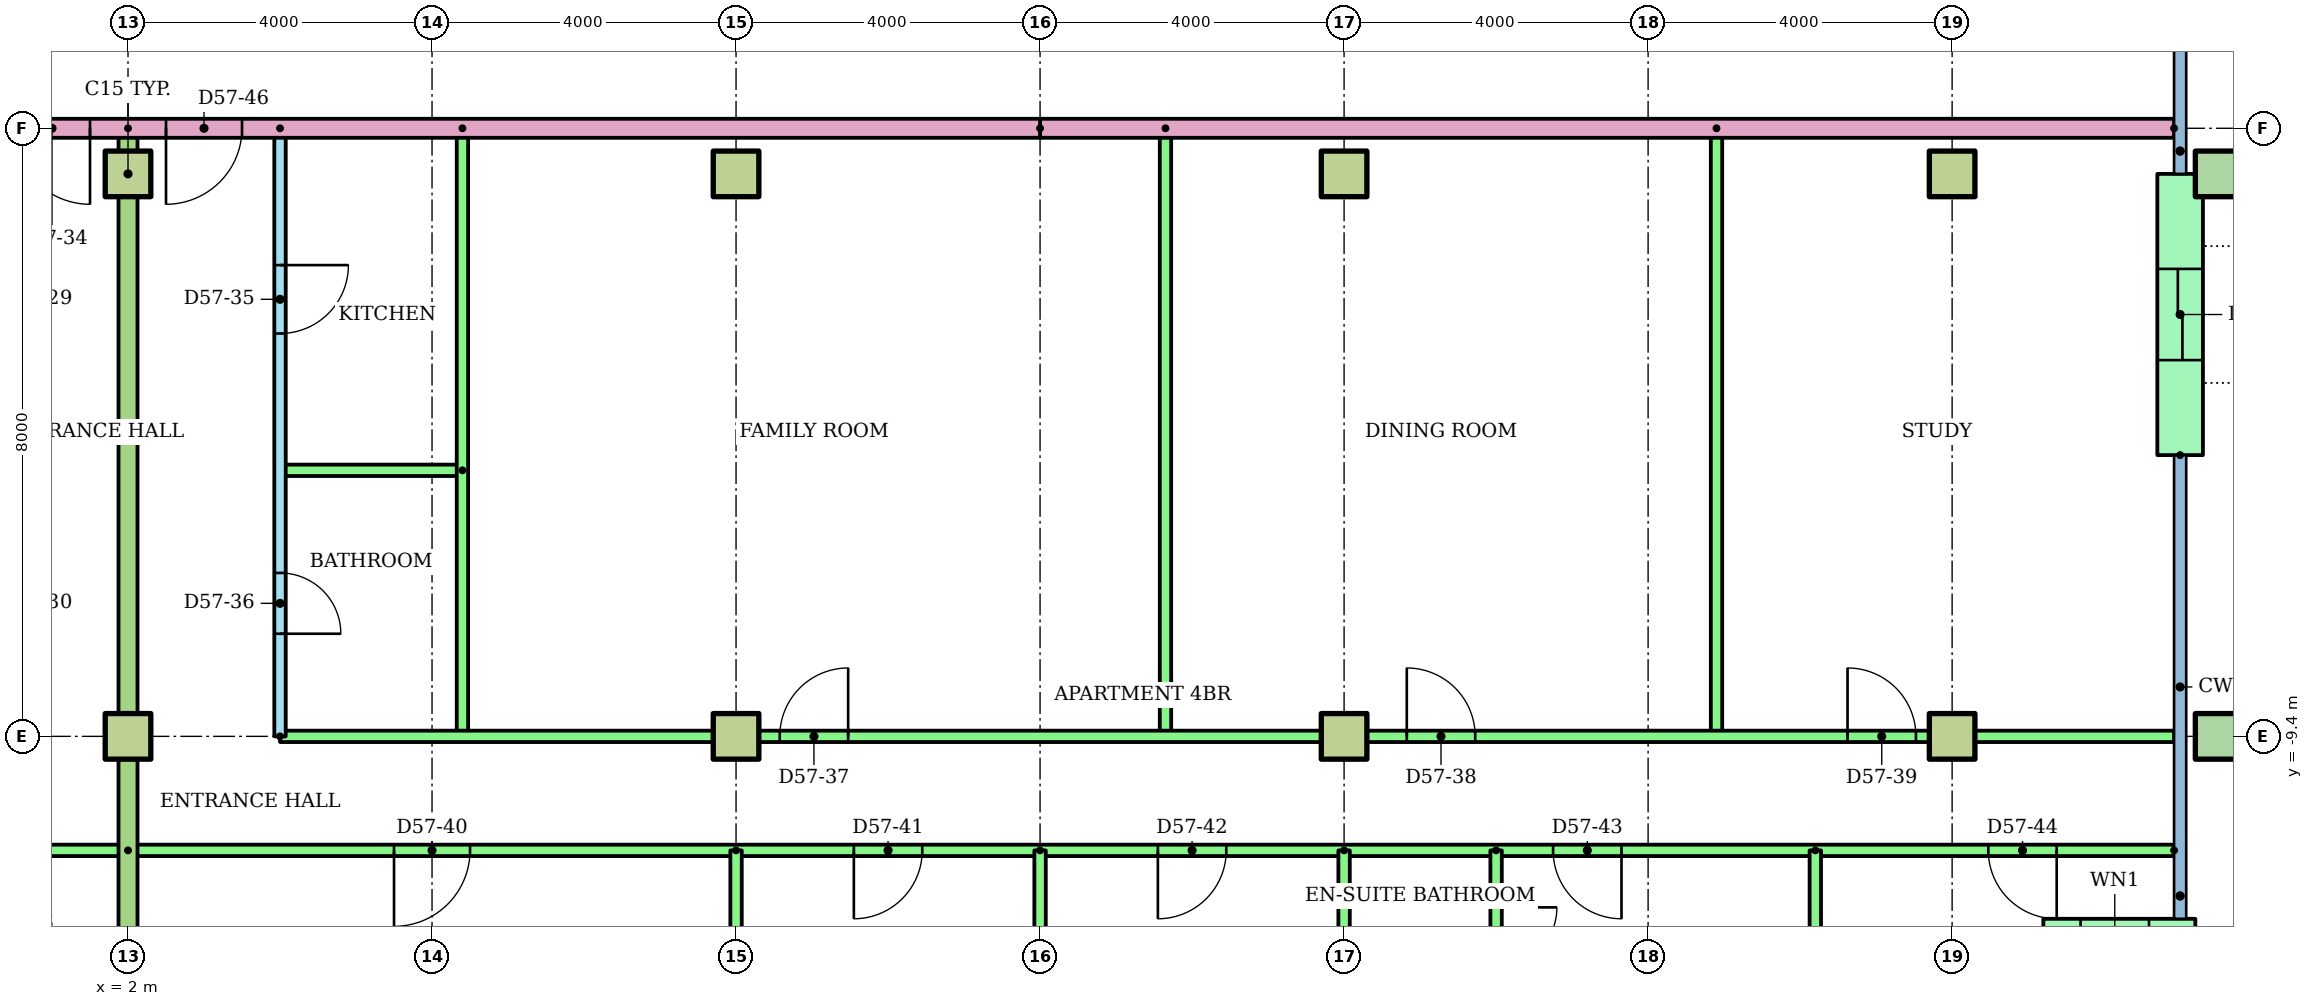
"""IFC4 building model, lengths in metres.
Left out: names, types, materials, properties, quantities, classifications, styles, units other than length and angle.
Written with IfcOpenShell. Run it as: python <this file> out.ifc"""

import sys

from ifc_helpers import new_model, si_unit, direction, frame, frame_2d, origin, origin_2d, place, context, subcontext, project, spatial, rectangle, hollow_rectangle, extrude, element, fill, save


model = new_model("IFC4")
c1 = context("Model", 3, precision=1e-05, world=origin(), true_north=direction((0.0, 1.0)))
c2 = subcontext(c1, "Body", "Model", "MODEL_VIEW")
j1 = project(units=[si_unit("LENGTHUNIT", "METRE"), si_unit("PLANEANGLEUNIT", "RADIAN")], contexts=[c1])
p1 = place(None, origin())
s1 = spatial("IfcSite", under=j1, at=p1, CompositionType="ELEMENT")
p2 = place(p1, origin())
s2 = spatial("IfcBuilding", under=s1, at=p2, CompositionType="ELEMENT")
p3 = place(p2, frame((0.0, 0.0, 220.4)))
s3 = spatial("IfcBuildingStorey", under=s2, at=p3, CompositionType="ELEMENT", Elevation=220.4)
for number, where in (
    (1, (2.0, -9.4, 0.0)),
    (2, (10.0, -9.4, 0.0)),
    (3, (18.0, -9.4, 0.0)),
    (4, (26.0, -9.4, 0.0)),
):
    element("IfcColumn", number, at=place(p3, frame(where)), inside=s3, PredefinedType="COLUMN", context=c2, shape_type="SweptSolid", body=[
        extrude(rectangle(XDim=0.6, YDim=0.6, at=origin_2d()), origin(), (0.0, 0.0, 1.0), 3.2),
    ])
p4 = place(p3, frame((29.5, -9.4, 0.0)))
e5 = element("IfcColumn", 5, at=p4, inside=s3, PredefinedType="COLUMN", context=c2, shape_type="SweptSolid", body=[
    extrude(hollow_rectangle(XDim=0.6, YDim=0.6, WallThickness=0.03, at=origin_2d()), origin(), (0.0, 0.0, 1.0), 3.2),
])
for number, where in (
    (6, (2.0, -2.0, 0.0)),
    (7, (10.0, -2.0, 0.0)),
    (8, (18.0, -2.0, 0.0)),
    (9, (26.0, -2.0, 0.0)),
):
    element("IfcColumn", number, at=place(p3, frame(where)), inside=s3, PredefinedType="COLUMN", context=c2, shape_type="SweptSolid", body=[
        extrude(rectangle(XDim=0.6, YDim=0.6, at=origin_2d()), origin(), (0.0, 0.0, 1.0), 3.2),
    ])
p5 = place(p3, frame((29.5, -2.0, 0.0)))
e10 = element("IfcColumn", 10, at=p5, inside=s3, PredefinedType="COLUMN", context=c2, shape_type="SweptSolid", body=[
    extrude(hollow_rectangle(XDim=0.6, YDim=0.6, WallThickness=0.03, at=origin_2d()), origin(), (0.0, 0.0, 1.0), 3.2),
])
p6 = place(p3, frame((27.2, -12.1, 0.0)))
e11 = element("IfcWall", 11, at=p6, inside=s3, PredefinedType="STANDARD", context=c2, shape_type="SweptSolid", body=[
    extrude(rectangle(XDim=2.0, YDim=0.6, at=frame_2d((1.0, 0.0))), origin(), (0.0, 0.0, 1.0), 2.92),
])
p7 = place(p6, frame((0.49, 0.0, 0.9)))
e12 = element("IfcOpeningElement", 12, at=p7, cuts=e11, PredefinedType="OPENING", context=c2, shape_type="SweptSolid", body=[
    extrude(rectangle(XDim=0.9, YDim=1.5, at=frame_2d((0.45, 0.75))), frame((0.0, 0.31, 0.0), z_axis=(0.0, -1.0, 0.0), x_axis=(1.0, 0.0, 0.0)), (0.0, 0.0, 1.0), 0.62),
])
p8 = place(p3, frame((29.0, -5.7, 0.0), z_axis=(0.0, 0.0, 1.0), x_axis=(0.0, 1.0, 0.0)))
e13 = element("IfcWall", 13, at=p8, inside=s3, PredefinedType="STANDARD", context=c2, shape_type="SweptSolid", body=[
    extrude(rectangle(XDim=3.7, YDim=0.6, at=frame_2d((1.85, 0.0))), origin(), (0.0, 0.0, 1.0), 2.92),
])
p9 = place(p8, frame((1.25, 0.0, 0.0)))
e14 = element("IfcOpeningElement", 14, at=p9, cuts=e13, PredefinedType="OPENING", context=c2, shape_type="SweptSolid", body=[
    extrude(rectangle(XDim=1.2, YDim=2.1, at=frame_2d((0.6, 1.05))), frame((0.0, 0.31, 0.0), z_axis=(0.0, -1.0, 0.0), x_axis=(1.0, 0.0, 0.0)), (0.0, 0.0, 1.0), 0.62),
])
p10 = place(p3, frame((2.0, -10.9, 0.0), z_axis=(0.0, 0.0, 1.0), x_axis=(-1.0, 0.0, 0.0)))
e15 = element("IfcWall", 15, at=p10, inside=s3, PredefinedType="PARTITIONING", context=c2, shape_type="SweptSolid", body=[
    extrude(rectangle(XDim=8.0, YDim=0.15, at=frame_2d((4.0, 0.0))), origin(), (0.0, 0.0, 1.0), 2.4),
])
p11 = place(p10, frame((5.55, 0.0, 0.0)))
e16 = element("IfcOpeningElement", 16, at=p11, cuts=e15, PredefinedType="OPENING", context=c2, shape_type="SweptSolid", body=[
    extrude(rectangle(XDim=0.9, YDim=2.1, at=frame_2d((0.45, 1.05))), frame((0.0, 0.085, 0.0), z_axis=(0.0, -1.0, 0.0), x_axis=(1.0, 0.0, 0.0)), (0.0, 0.0, 1.0), 0.17),
])
p12 = place(p10, frame((1.5, 0.0, 0.0)))
e17 = element("IfcOpeningElement", 17, at=p12, cuts=e15, PredefinedType="OPENING", context=c2, shape_type="SweptSolid", body=[
    extrude(rectangle(XDim=1.0, YDim=2.1, at=frame_2d((0.5, 1.05))), frame((0.0, 0.085, 0.0), z_axis=(0.0, -1.0, 0.0), x_axis=(1.0, 0.0, 0.0)), (0.0, 0.0, 1.0), 0.17),
])
p13 = place(p3, frame((4.0, -1.4, 0.0), z_axis=(0.0, 0.0, 1.0), x_axis=(0.0, -1.0, 0.0)))
e18 = element("IfcWall", 18, at=p13, inside=s3, PredefinedType="PARTITIONING", context=c2, shape_type="SweptSolid", body=[
    extrude(rectangle(XDim=8.0, YDim=0.15, at=frame_2d((4.0, 0.0))), origin(), (0.0, 0.0, 1.0), 2.4),
])
p14 = place(p13, frame((1.8, 0.0, 0.0)))
e19 = element("IfcOpeningElement", 19, at=p14, cuts=e18, PredefinedType="OPENING", context=c2, shape_type="SweptSolid", body=[
    extrude(rectangle(XDim=0.9, YDim=2.1, at=frame_2d((0.45, 1.05))), frame((0.0, 0.085, 0.0), z_axis=(0.0, -1.0, 0.0), x_axis=(1.0, 0.0, 0.0)), (0.0, 0.0, 1.0), 0.17),
])
p15 = place(p13, frame((5.85, 0.0, 0.0)))
e20 = element("IfcOpeningElement", 20, at=p15, cuts=e18, PredefinedType="OPENING", context=c2, shape_type="SweptSolid", body=[
    extrude(rectangle(XDim=0.8, YDim=2.1, at=frame_2d((0.4, 1.05))), frame((0.0, 0.085, 0.0), z_axis=(0.0, -1.0, 0.0), x_axis=(1.0, 0.0, 0.0)), (0.0, 0.0, 1.0), 0.17),
])
p16 = place(p3, frame((6.4, -5.9, 0.0), z_axis=(0.0, 0.0, 1.0), x_axis=(-1.0, 0.0, 0.0)))
e21 = element("IfcWall", 21, at=p16, inside=s3, PredefinedType="PARTITIONING", context=c2, shape_type="SweptSolid", body=[
    extrude(rectangle(XDim=2.4, YDim=0.15, at=frame_2d((1.2, 0.0))), origin(), (0.0, 0.0, 1.0), 2.4),
])
for number, where, z_axis, x_axis in (
    (22, (6.4, -1.4, 0.0), (0.0, 0.0, 1.0), (0.0, -1.0, 0.0)),
    (23, (15.65, -1.4, 0.0), (0.0, 0.0, 1.0), (0.0, -1.0, 0.0)),
    (24, (22.9, -1.4, 0.0), (0.0, 0.0, 1.0), (0.0, -1.0, 0.0)),
):
    element("IfcWall", number, at=place(p3, frame(where, z_axis=z_axis, x_axis=x_axis)), inside=s3, PredefinedType="PARTITIONING", context=c2, shape_type="SweptSolid", body=[
        extrude(rectangle(XDim=8.0, YDim=0.15, at=frame_2d((4.0, 0.0))), origin(), (0.0, 0.0, 1.0), 2.4),
    ])
p17 = place(p3, frame((4.0, -9.4, 0.0)))
e25 = element("IfcWall", 25, at=p17, inside=s3, PredefinedType="PARTITIONING", context=c2, shape_type="SweptSolid", body=[
    extrude(rectangle(XDim=24.92, YDim=0.15, at=frame_2d((12.46, 0.0))), origin(), (0.0, 0.0, 1.0), 2.4),
])
p18 = place(p17, frame((6.575, 0.0, 0.0)))
e26 = element("IfcOpeningElement", 26, at=p18, cuts=e25, PredefinedType="OPENING", context=c2, shape_type="SweptSolid", body=[
    extrude(rectangle(XDim=0.9, YDim=2.1, at=frame_2d((0.45, 1.05))), frame((0.0, 0.085, 0.0), z_axis=(0.0, -1.0, 0.0), x_axis=(1.0, 0.0, 0.0)), (0.0, 0.0, 1.0), 0.17),
])
p19 = place(p17, frame((14.825, 0.0, 0.0)))
e27 = element("IfcOpeningElement", 27, at=p19, cuts=e25, PredefinedType="OPENING", context=c2, shape_type="SweptSolid", body=[
    extrude(rectangle(XDim=0.9, YDim=2.1, at=frame_2d((0.45, 1.05))), frame((0.0, 0.085, 0.0), z_axis=(0.0, -1.0, 0.0), x_axis=(1.0, 0.0, 0.0)), (0.0, 0.0, 1.0), 0.17),
])
p20 = place(p17, frame((20.624, 0.0, 0.0)))
e28 = element("IfcOpeningElement", 28, at=p20, cuts=e25, PredefinedType="OPENING", context=c2, shape_type="SweptSolid", body=[
    extrude(rectangle(XDim=0.9, YDim=2.1, at=frame_2d((0.45, 1.05))), frame((0.0, 0.085, 0.0), z_axis=(0.0, -1.0, 0.0), x_axis=(1.0, 0.0, 0.0)), (0.0, 0.0, 1.0), 0.17),
])
p21 = place(p3, frame((28.92, -10.9, 0.0), z_axis=(0.0, 0.0, 1.0), x_axis=(-1.0, 0.0, 0.0)))
e29 = element("IfcWall", 29, at=p21, inside=s3, PredefinedType="PARTITIONING", context=c2, shape_type="SweptSolid", body=[
    extrude(rectangle(XDim=26.92, YDim=0.15, at=frame_2d((13.46, 0.0))), origin(), (0.0, 0.0, 1.0), 2.4),
])
p22 = place(p21, frame((22.42, 0.0, 0.0)))
e30 = element("IfcOpeningElement", 30, at=p22, cuts=e29, PredefinedType="OPENING", context=c2, shape_type="SweptSolid", body=[
    extrude(rectangle(XDim=1.0, YDim=2.1, at=frame_2d((0.5, 1.05))), frame((0.0, 0.085, 0.0), z_axis=(0.0, -1.0, 0.0), x_axis=(1.0, 0.0, 0.0)), (0.0, 0.0, 1.0), 0.17),
])
p23 = place(p21, frame((16.47, 0.0, 0.0)))
e31 = element("IfcOpeningElement", 31, at=p23, cuts=e29, PredefinedType="OPENING", context=c2, shape_type="SweptSolid", body=[
    extrude(rectangle(XDim=0.9, YDim=2.1, at=frame_2d((0.45, 1.05))), frame((0.0, 0.085, 0.0), z_axis=(0.0, -1.0, 0.0), x_axis=(1.0, 0.0, 0.0)), (0.0, 0.0, 1.0), 0.17),
])
p24 = place(p21, frame((12.47, 0.0, 0.0)))
e32 = element("IfcOpeningElement", 32, at=p24, cuts=e29, PredefinedType="OPENING", context=c2, shape_type="SweptSolid", body=[
    extrude(rectangle(XDim=0.9, YDim=2.1, at=frame_2d((0.45, 1.05))), frame((0.0, 0.085, 0.0), z_axis=(0.0, -1.0, 0.0), x_axis=(1.0, 0.0, 0.0)), (0.0, 0.0, 1.0), 0.17),
])
p25 = place(p21, frame((7.27, 0.0, 0.0)))
e33 = element("IfcOpeningElement", 33, at=p25, cuts=e29, PredefinedType="OPENING", context=c2, shape_type="SweptSolid", body=[
    extrude(rectangle(XDim=0.9, YDim=2.1, at=frame_2d((0.45, 1.05))), frame((0.0, 0.085, 0.0), z_axis=(0.0, -1.0, 0.0), x_axis=(1.0, 0.0, 0.0)), (0.0, 0.0, 1.0), 0.17),
])
p26 = place(p21, frame((1.544, 0.0, 0.0)))
e34 = element("IfcOpeningElement", 34, at=p26, cuts=e29, PredefinedType="OPENING", context=c2, shape_type="SweptSolid", body=[
    extrude(rectangle(XDim=0.9, YDim=2.1, at=frame_2d((0.45, 1.05))), frame((0.0, 0.085, 0.0), z_axis=(0.0, -1.0, 0.0), x_axis=(1.0, 0.0, 0.0)), (0.0, 0.0, 1.0), 0.17),
])
p27 = place(p3, frame((10.0, -10.9, 0.0), z_axis=(0.0, 0.0, 1.0), x_axis=(0.0, -1.0, 0.0)))
e35 = element("IfcWall", 35, at=p27, inside=s3, PredefinedType="PARTITIONING", context=c2, shape_type="SweptSolid", body=[
    extrude(rectangle(XDim=5.61, YDim=0.15, at=frame_2d((2.805, 0.0))), origin(), (0.0, 0.0, 1.0), 2.4),
])
p28 = place(p3, frame((14.0, -10.9, 0.0), z_axis=(0.0, 0.0, 1.0), x_axis=(0.0, -1.0, 0.0)))
e36 = element("IfcWall", 36, at=p28, inside=s3, PredefinedType="PARTITIONING", context=c2, shape_type="SweptSolid", body=[
    extrude(rectangle(XDim=5.621, YDim=0.15, at=frame_2d((2.811, 0.0))), origin(), (0.0, 0.0, 1.0), 2.4),
])
p29 = place(p3, frame((18.0, -10.9, 0.0), z_axis=(0.0, 0.0, 1.0), x_axis=(0.0, -1.0, 0.0)))
e37 = element("IfcWall", 37, at=p29, inside=s3, PredefinedType="PARTITIONING", context=c2, shape_type="SweptSolid", body=[
    extrude(rectangle(XDim=5.61, YDim=0.15, at=frame_2d((2.805, 0.0))), origin(), (0.0, 0.0, 1.0), 2.4),
])
p30 = place(p3, frame((24.2, -10.9, 0.0), z_axis=(0.0, 0.0, 1.0), x_axis=(0.0, -1.0, 0.0)))
e38 = element("IfcWall", 38, at=p30, inside=s3, PredefinedType="PARTITIONING", context=c2, shape_type="SweptSolid", body=[
    extrude(rectangle(XDim=3.82, YDim=0.15, at=frame_2d((1.91, 0.0))), origin(), (0.0, 0.0, 1.0), 2.4),
])
p31 = place(p3, frame((20.0, -10.9, 0.0), z_axis=(0.0, 0.0, 1.0), x_axis=(0.0, -1.0, 0.0)))
e39 = element("IfcWall", 39, at=p31, inside=s3, PredefinedType="PARTITIONING", context=c2, shape_type="SweptSolid", body=[
    extrude(rectangle(XDim=2.3, YDim=0.15, at=frame_2d((1.15, 0.0))), origin(), (0.0, 0.0, 1.0), 2.4),
])
p32 = place(p31, frame((0.75, 0.0, 0.0)))
e40 = element("IfcOpeningElement", 40, at=p32, cuts=e39, PredefinedType="OPENING", context=c2, shape_type="SweptSolid", body=[
    extrude(rectangle(XDim=0.8, YDim=2.1, at=frame_2d((0.4, 1.05))), frame((0.0, 0.085, 0.0), z_axis=(0.0, -1.0, 0.0), x_axis=(1.0, 0.0, 0.0)), (0.0, 0.0, 1.0), 0.17),
])
p33 = place(p3, frame((2.0, -1.4, 0.0), z_axis=(0.0, 0.0, 1.0), x_axis=(0.0, -1.0, 0.0)))
e41 = element("IfcWall", 41, at=p33, inside=s3, PredefinedType="PARTITIONING", context=c2, shape_type="SweptSolid", body=[
    extrude(rectangle(XDim=15.11, YDim=0.25, at=frame_2d((7.555, 0.0))), origin(), (0.0, 0.0, 1.0), 2.4),
])
p34 = place(p3, frame((28.92, -1.4, 0.0), z_axis=(0.0, 0.0, 1.0), x_axis=(-1.0, 0.0, 0.0)))
e42 = element("IfcWall", 42, at=p34, inside=s3, PredefinedType="PARTITIONING", context=c2, shape_type="SweptSolid", body=[
    extrude(rectangle(XDim=14.92, YDim=0.25, at=frame_2d((7.46, 0.0))), origin(), (0.0, 0.0, 1.0), 2.4),
])
p35 = place(p3, frame((14.0, -1.4, 0.0), z_axis=(0.0, 0.0, 1.0), x_axis=(-1.0, 0.0, 0.0)))
e43 = element("IfcWall", 43, at=p35, inside=s3, PredefinedType="PARTITIONING", context=c2, shape_type="SweptSolid", body=[
    extrude(rectangle(XDim=28.0, YDim=0.25, at=frame_2d((14.0, 0.0))), origin(), (0.0, 0.0, 1.0), 2.4),
])
p36 = place(p35, frame((20.5, 0.0, 0.0)))
e44 = element("IfcOpeningElement", 44, at=p36, cuts=e43, PredefinedType="OPENING", context=c2, shape_type="SweptSolid", body=[
    extrude(rectangle(XDim=1.0, YDim=2.1, at=frame_2d((0.5, 1.05))), frame((0.0, 0.135, 0.0), z_axis=(0.0, -1.0, 0.0), x_axis=(1.0, 0.0, 0.0)), (0.0, 0.0, 1.0), 0.27),
])
p37 = place(p35, frame((12.5, 0.0, 0.0)))
e45 = element("IfcOpeningElement", 45, at=p37, cuts=e43, PredefinedType="OPENING", context=c2, shape_type="SweptSolid", body=[
    extrude(rectangle(XDim=1.0, YDim=2.1, at=frame_2d((0.5, 1.05))), frame((0.0, 0.135, 0.0), z_axis=(0.0, -1.0, 0.0), x_axis=(1.0, 0.0, 0.0)), (0.0, 0.0, 1.0), 0.27),
])
p38 = place(p35, frame((10.5, 0.0, 0.0)))
e46 = element("IfcOpeningElement", 46, at=p38, cuts=e43, PredefinedType="OPENING", context=c2, shape_type="SweptSolid", body=[
    extrude(rectangle(XDim=1.0, YDim=2.1, at=frame_2d((0.5, 1.05))), frame((0.0, 0.135, 0.0), z_axis=(0.0, -1.0, 0.0), x_axis=(1.0, 0.0, 0.0)), (0.0, 0.0, 1.0), 0.27),
])
p39 = place(p37, origin())
e47 = element("IfcDoor", 47, at=p39, inside=s3, OperationType="SINGLE_SWING_LEFT", PredefinedType="DOOR", context=c2, shape_type="SweptSolid", body=[
    extrude(rectangle(XDim=1.0, YDim=2.1, at=frame_2d((0.5, 1.05))), frame((0.0, 0.025, 0.0), z_axis=(0.0, -1.0, 0.0), x_axis=(1.0, 0.0, 0.0)), (0.0, 0.0, 1.0), 0.05),
])
fill(e45, e47)
p40 = place(p14, origin())
e48 = element("IfcDoor", 48, at=p40, inside=s3, OperationType="SINGLE_SWING_LEFT", PredefinedType="DOOR", context=c2, shape_type="SweptSolid", body=[
    extrude(rectangle(XDim=0.9, YDim=2.1, at=frame_2d((0.45, 1.05))), frame((0.0, 0.025, 0.0), z_axis=(0.0, -1.0, 0.0), x_axis=(1.0, 0.0, 0.0)), (0.0, 0.0, 1.0), 0.05),
])
fill(e19, e48)
p41 = place(p15, origin())
e49 = element("IfcDoor", 49, at=p41, inside=s3, OperationType="SINGLE_SWING_RIGHT", PredefinedType="DOOR", context=c2, shape_type="SweptSolid", body=[
    extrude(rectangle(XDim=0.8, YDim=2.1, at=frame_2d((0.4, 1.05))), frame((0.0, 0.025, 0.0), z_axis=(0.0, -1.0, 0.0), x_axis=(1.0, 0.0, 0.0)), (0.0, 0.0, 1.0), 0.05),
])
fill(e20, e49)
p42 = place(p18, origin())
e50 = element("IfcDoor", 50, at=p42, inside=s3, OperationType="SINGLE_SWING_RIGHT", PredefinedType="DOOR", context=c2, shape_type="SweptSolid", body=[
    extrude(rectangle(XDim=0.9, YDim=2.1, at=frame_2d((0.45, 1.05))), frame((0.0, 0.025, 0.0), z_axis=(0.0, -1.0, 0.0), x_axis=(1.0, 0.0, 0.0)), (0.0, 0.0, 1.0), 0.05),
])
fill(e26, e50)
p43 = place(p19, origin())
e51 = element("IfcDoor", 51, at=p43, inside=s3, OperationType="SINGLE_SWING_LEFT", PredefinedType="DOOR", context=c2, shape_type="SweptSolid", body=[
    extrude(rectangle(XDim=0.9, YDim=2.1, at=frame_2d((0.45, 1.05))), frame((0.0, 0.025, 0.0), z_axis=(0.0, -1.0, 0.0), x_axis=(1.0, 0.0, 0.0)), (0.0, 0.0, 1.0), 0.05),
])
fill(e27, e51)
p44 = place(p20, origin())
e52 = element("IfcDoor", 52, at=p44, inside=s3, OperationType="SINGLE_SWING_LEFT", PredefinedType="DOOR", context=c2, shape_type="SweptSolid", body=[
    extrude(rectangle(XDim=0.9, YDim=2.1, at=frame_2d((0.45, 1.05))), frame((0.0, 0.025, 0.0), z_axis=(0.0, -1.0, 0.0), x_axis=(1.0, 0.0, 0.0)), (0.0, 0.0, 1.0), 0.05),
])
fill(e28, e52)
p45 = place(p22, origin())
e53 = element("IfcDoor", 53, at=p45, inside=s3, OperationType="SINGLE_SWING_RIGHT", PredefinedType="DOOR", context=c2, shape_type="SweptSolid", body=[
    extrude(rectangle(XDim=1.0, YDim=2.1, at=frame_2d((0.5, 1.05))), frame((0.0, 0.025, 0.0), z_axis=(0.0, -1.0, 0.0), x_axis=(1.0, 0.0, 0.0)), (0.0, 0.0, 1.0), 0.05),
])
fill(e30, e53)
p46 = place(p23, origin())
e54 = element("IfcDoor", 54, at=p46, inside=s3, OperationType="SINGLE_SWING_RIGHT", PredefinedType="DOOR", context=c2, shape_type="SweptSolid", body=[
    extrude(rectangle(XDim=0.9, YDim=2.1, at=frame_2d((0.45, 1.05))), frame((0.0, 0.025, 0.0), z_axis=(0.0, -1.0, 0.0), x_axis=(1.0, 0.0, 0.0)), (0.0, 0.0, 1.0), 0.05),
])
fill(e31, e54)
p47 = place(p24, origin())
e55 = element("IfcDoor", 55, at=p47, inside=s3, OperationType="SINGLE_SWING_RIGHT", PredefinedType="DOOR", context=c2, shape_type="SweptSolid", body=[
    extrude(rectangle(XDim=0.9, YDim=2.1, at=frame_2d((0.45, 1.05))), frame((0.0, 0.025, 0.0), z_axis=(0.0, -1.0, 0.0), x_axis=(1.0, 0.0, 0.0)), (0.0, 0.0, 1.0), 0.05),
])
fill(e32, e55)
p48 = place(p25, origin())
e56 = element("IfcDoor", 56, at=p48, inside=s3, OperationType="SINGLE_SWING_LEFT", PredefinedType="DOOR", context=c2, shape_type="SweptSolid", body=[
    extrude(rectangle(XDim=0.9, YDim=2.1, at=frame_2d((0.45, 1.05))), frame((0.0, 0.025, 0.0), z_axis=(0.0, -1.0, 0.0), x_axis=(1.0, 0.0, 0.0)), (0.0, 0.0, 1.0), 0.05),
])
fill(e33, e56)
p49 = place(p26, origin())
e57 = element("IfcDoor", 57, at=p49, inside=s3, OperationType="SINGLE_SWING_LEFT", PredefinedType="DOOR", context=c2, shape_type="SweptSolid", body=[
    extrude(rectangle(XDim=0.9, YDim=2.1, at=frame_2d((0.45, 1.05))), frame((0.0, 0.025, 0.0), z_axis=(0.0, -1.0, 0.0), x_axis=(1.0, 0.0, 0.0)), (0.0, 0.0, 1.0), 0.05),
])
fill(e34, e57)
p50 = place(p32, origin())
e58 = element("IfcDoor", 58, at=p50, inside=s3, OperationType="SINGLE_SWING_LEFT", PredefinedType="DOOR", context=c2, shape_type="SweptSolid", body=[
    extrude(rectangle(XDim=0.8, YDim=2.1, at=frame_2d((0.4, 1.05))), frame((0.0, 0.025, 0.0), z_axis=(0.0, -1.0, 0.0), x_axis=(1.0, 0.0, 0.0)), (0.0, 0.0, 1.0), 0.05),
])
fill(e40, e58)
p51 = place(p38, origin())
e59 = element("IfcDoor", 59, at=p51, inside=s3, OperationType="SINGLE_SWING_RIGHT", PredefinedType="DOOR", context=c2, shape_type="SweptSolid", body=[
    extrude(rectangle(XDim=1.0, YDim=2.1, at=frame_2d((0.5, 1.05))), frame((0.0, 0.025, 0.0), z_axis=(0.0, -1.0, 0.0), x_axis=(1.0, 0.0, 0.0)), (0.0, 0.0, 1.0), 0.05),
])
fill(e46, e59)
p52 = place(p9, origin())
e60 = element("IfcDoor", 60, at=p52, inside=s3, OperationType="SLIDING_TO_LEFT", PredefinedType="DOOR", context=c2, shape_type="SweptSolid", body=[
    extrude(rectangle(XDim=1.2, YDim=2.1, at=frame_2d((0.6, 1.05))), frame((0.0, 0.025, 0.0), z_axis=(0.0, -1.0, 0.0), x_axis=(1.0, 0.0, 0.0)), (0.0, 0.0, 1.0), 0.05),
])
fill(e14, e60)
save(model, sys.argv[1])
